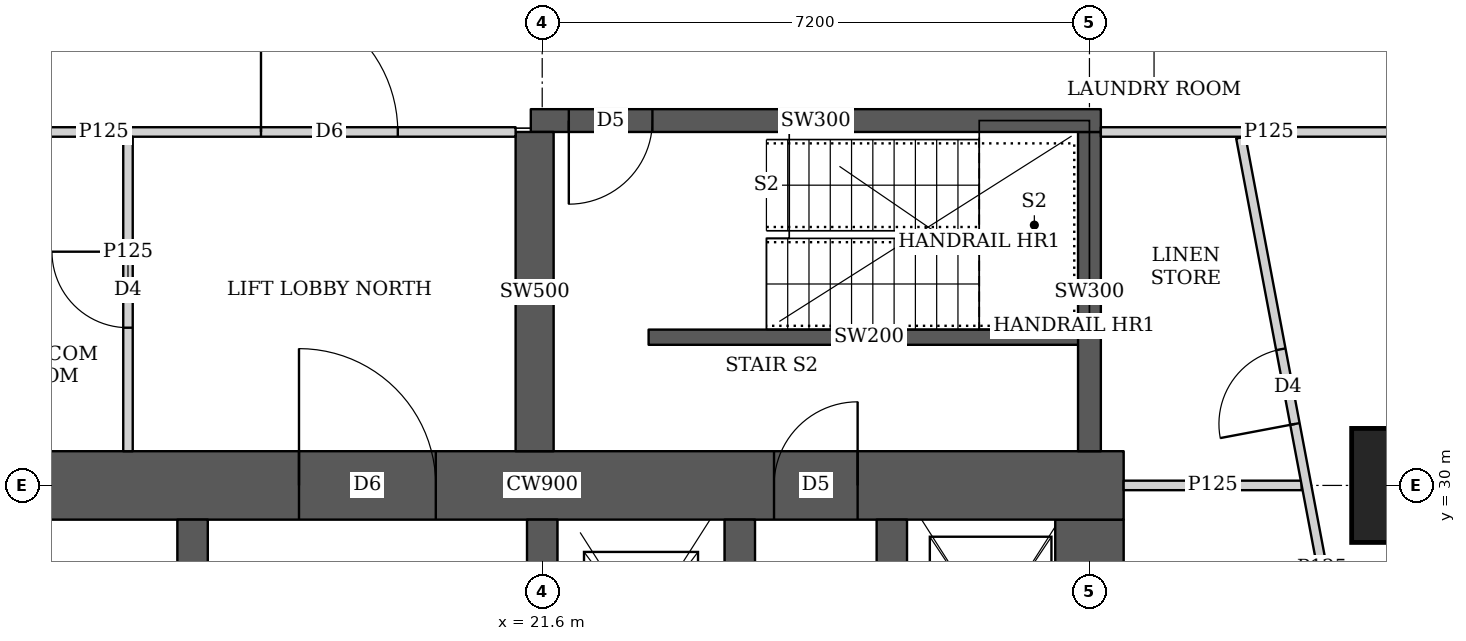
"""IFC4 building model, lengths in metres.
Left out: names, types, materials, properties, quantities, classifications, styles, units other than length and angle.
Written with IfcOpenShell. Run it as: python <this file> out.ifc"""

import sys

from ifc_helpers import new_model, si_unit, direction, frame, frame_2d, origin, origin_2d, place, context, subcontext, project, spatial, rectangle, extrude, element, fill, save


model = new_model("IFC4")
c1 = context("Model", 3, precision=1e-05, world=origin(), true_north=direction((0.0, 1.0)))
c2 = subcontext(c1, "Body", "Model", "MODEL_VIEW")
j1 = project(units=[si_unit("LENGTHUNIT", "METRE"), si_unit("PLANEANGLEUNIT", "RADIAN")], contexts=[c1])
p1 = place(None, origin())
s1 = spatial("IfcSite", under=j1, at=p1, CompositionType="ELEMENT")
p2 = place(p1, origin())
s2 = spatial("IfcBuilding", under=s1, at=p2, CompositionType="ELEMENT")
p3 = place(p2, frame((0.0, 0.0, 139.55)))
s3 = spatial("IfcBuildingStorey", under=s2, at=p3, CompositionType="ELEMENT", Elevation=139.55)
p4 = place(p3, frame((33.0, 30.0, 0.0), z_axis=(0.0, 0.0, 1.0), x_axis=(1.0, 0.0, 0.0)))
e1 = element("IfcColumn", 1, at=p4, inside=s3, PredefinedType="COLUMN", context=c2, shape_type="SweptSolid", body=[
    extrude(rectangle(XDim=1.5, YDim=1.5, at=origin_2d()), origin(), (0.0, 0.0, 1.0), 3.75),
])
p5 = place(p3, frame((13.95, 30.0, 0.0), z_axis=(0.0, 0.0, 1.0), x_axis=(1.0, 0.0, 0.0)))
e2 = element("IfcWall", 2, at=p5, inside=s3, PredefinedType="SHEAR", context=c2, shape_type="SweptSolid", body=[
    extrude(rectangle(XDim=15.3, YDim=0.9, at=frame_2d((7.65, 0.0))), origin(), (0.0, 0.0, 1.0), 3.75),
])
p6 = place(p5, frame((4.45, 0.0, 0.0)))
e3 = element("IfcOpeningElement", 3, at=p6, cuts=e2, PredefinedType="OPENING", context=c2, shape_type="SweptSolid", body=[
    extrude(rectangle(XDim=1.8, YDim=2.1, at=frame_2d((0.9, 1.05))), frame((0.0, 0.46, 0.0), z_axis=(0.0, -1.0, 0.0), x_axis=(1.0, 0.0, 0.0)), (0.0, 0.0, 1.0), 0.92),
])
p7 = place(p5, frame((10.7, 0.0, 0.0)))
e4 = element("IfcOpeningElement", 4, at=p7, cuts=e2, PredefinedType="OPENING", context=c2, shape_type="SweptSolid", body=[
    extrude(rectangle(XDim=1.1, YDim=2.1, at=frame_2d((0.55, 1.05))), frame((0.0, 0.46, 0.0), z_axis=(0.0, -1.0, 0.0), x_axis=(1.0, 0.0, 0.0)), (0.0, 0.0, 1.0), 0.92),
])
p8 = place(p3, frame((28.8, 15.45, 0.0), z_axis=(0.0, 0.0, 1.0), x_axis=(0.0, 1.0, 0.0)))
e5 = element("IfcWall", 5, at=p8, inside=s3, PredefinedType="SHEAR", context=c2, shape_type="SweptSolid", body=[
    extrude(rectangle(XDim=14.1, YDim=0.9, at=frame_2d((7.05, 0.0))), origin(), (0.0, 0.0, 1.0), 3.75),
])
p9 = place(p3, frame((17.0, 15.45, 0.0), z_axis=(0.0, 0.0, 1.0), x_axis=(0.0, 1.0, 0.0)))
e6 = element("IfcWall", 6, at=p9, inside=s3, PredefinedType="SHEAR", context=c2, shape_type="SweptSolid", body=[
    extrude(rectangle(XDim=14.1, YDim=0.4, at=frame_2d((7.05, 0.0))), origin(), (0.0, 0.0, 1.0), 3.75),
])
p10 = place(p9, frame((0.925, 0.0, 0.0)))
e7 = element("IfcOpeningElement", 7, at=p10, cuts=e6, PredefinedType="OPENING", context=c2, shape_type="SweptSolid", body=[
    extrude(rectangle(XDim=1.0, YDim=2.1, at=frame_2d((0.5, 1.05))), frame((0.0, 0.21, 0.0), z_axis=(0.0, -1.0, 0.0), x_axis=(1.0, 0.0, 0.0)), (0.0, 0.0, 1.0), 0.42),
])
p11 = place(p9, frame((4.675, 0.0, 0.0)))
e8 = element("IfcOpeningElement", 8, at=p11, cuts=e6, PredefinedType="OPENING", context=c2, shape_type="SweptSolid", body=[
    extrude(rectangle(XDim=1.0, YDim=2.1, at=frame_2d((0.5, 1.05))), frame((0.0, 0.21, 0.0), z_axis=(0.0, -1.0, 0.0), x_axis=(1.0, 0.0, 0.0)), (0.0, 0.0, 1.0), 0.42),
])
p12 = place(p9, frame((8.425, 0.0, 0.0)))
e9 = element("IfcOpeningElement", 9, at=p12, cuts=e6, PredefinedType="OPENING", context=c2, shape_type="SweptSolid", body=[
    extrude(rectangle(XDim=1.0, YDim=2.1, at=frame_2d((0.5, 1.05))), frame((0.0, 0.21, 0.0), z_axis=(0.0, -1.0, 0.0), x_axis=(1.0, 0.0, 0.0)), (0.0, 0.0, 1.0), 0.42),
])
p13 = place(p9, frame((12.175, 0.0, 0.0)))
e10 = element("IfcOpeningElement", 10, at=p13, cuts=e6, PredefinedType="OPENING", context=c2, shape_type="SweptSolid", body=[
    extrude(rectangle(XDim=1.0, YDim=2.1, at=frame_2d((0.5, 1.05))), frame((0.0, 0.21, 0.0), z_axis=(0.0, -1.0, 0.0), x_axis=(1.0, 0.0, 0.0)), (0.0, 0.0, 1.0), 0.42),
])
p14 = place(p3, frame((21.6, 15.45, 0.0), z_axis=(0.0, 0.0, 1.0), x_axis=(0.0, 1.0, 0.0)))
e11 = element("IfcWall", 11, at=p14, inside=s3, PredefinedType="SHEAR", context=c2, shape_type="SweptSolid", body=[
    extrude(rectangle(XDim=14.1, YDim=0.4, at=frame_2d((7.05, 0.0))), origin(), (0.0, 0.0, 1.0), 3.75),
])
p15 = place(p14, frame((0.875, 0.0, 0.0)))
e12 = element("IfcOpeningElement", 12, at=p15, cuts=e11, PredefinedType="OPENING", context=c2, shape_type="SweptSolid", body=[
    extrude(rectangle(XDim=1.1, YDim=2.1, at=frame_2d((0.55, 1.05))), frame((0.0, 0.21, 0.0), z_axis=(0.0, -1.0, 0.0), x_axis=(1.0, 0.0, 0.0)), (0.0, 0.0, 1.0), 0.42),
])
p16 = place(p14, frame((4.625, 0.0, 0.0)))
e13 = element("IfcOpeningElement", 13, at=p16, cuts=e11, PredefinedType="OPENING", context=c2, shape_type="SweptSolid", body=[
    extrude(rectangle(XDim=1.1, YDim=2.1, at=frame_2d((0.55, 1.05))), frame((0.0, 0.21, 0.0), z_axis=(0.0, -1.0, 0.0), x_axis=(1.0, 0.0, 0.0)), (0.0, 0.0, 1.0), 0.42),
])
p17 = place(p14, frame((8.375, 0.0, 0.0)))
e14 = element("IfcOpeningElement", 14, at=p17, cuts=e11, PredefinedType="OPENING", context=c2, shape_type="SweptSolid", body=[
    extrude(rectangle(XDim=1.1, YDim=2.1, at=frame_2d((0.55, 1.05))), frame((0.0, 0.21, 0.0), z_axis=(0.0, -1.0, 0.0), x_axis=(1.0, 0.0, 0.0)), (0.0, 0.0, 1.0), 0.42),
])
p18 = place(p14, frame((12.125, 0.0, 0.0)))
e15 = element("IfcOpeningElement", 15, at=p18, cuts=e11, PredefinedType="OPENING", context=c2, shape_type="SweptSolid", body=[
    extrude(rectangle(XDim=1.1, YDim=2.1, at=frame_2d((0.55, 1.05))), frame((0.0, 0.21, 0.0), z_axis=(0.0, -1.0, 0.0), x_axis=(1.0, 0.0, 0.0)), (0.0, 0.0, 1.0), 0.42),
])
p19 = place(p3, frame((24.2, 15.45, 0.0), z_axis=(0.0, 0.0, 1.0), x_axis=(0.0, 1.0, 0.0)))
e16 = element("IfcWall", 16, at=p19, inside=s3, PredefinedType="SHEAR", context=c2, shape_type="SweptSolid", body=[
    extrude(rectangle(XDim=14.1, YDim=0.4, at=frame_2d((7.05, 0.0))), origin(), (0.0, 0.0, 1.0), 3.75),
])
p20 = place(p3, frame((26.2, 26.45, 0.0), z_axis=(0.0, 0.0, 1.0), x_axis=(0.0, 1.0, 0.0)))
e17 = element("IfcWall", 17, at=p20, inside=s3, PredefinedType="SHEAR", context=c2, shape_type="SweptSolid", body=[
    extrude(rectangle(XDim=3.1, YDim=0.4, at=frame_2d((1.55, 0.0))), origin(), (0.0, 0.0, 1.0), 3.75),
])
p21 = place(p20, frame((1.075, 0.0, 0.0)))
e18 = element("IfcOpeningElement", 18, at=p21, cuts=e17, PredefinedType="OPENING", context=c2, shape_type="SweptSolid", body=[
    extrude(rectangle(XDim=1.2, YDim=2.1, at=frame_2d((0.6, 1.05))), frame((0.0, 0.21, 0.0), z_axis=(0.0, -1.0, 0.0), x_axis=(1.0, 0.0, 0.0)), (0.0, 0.0, 1.0), 0.42),
])
p22 = place(p3, frame((21.45, 34.8, 0.0), z_axis=(0.0, 0.0, 1.0), x_axis=(1.0, 0.0, 0.0)))
e19 = element("IfcWall", 19, at=p22, inside=s3, PredefinedType="SHEAR", context=c2, shape_type="SweptSolid", body=[
    extrude(rectangle(XDim=7.5, YDim=0.3, at=frame_2d((3.75, 0.0))), origin(), (0.0, 0.0, 1.0), 3.75),
])
p23 = place(p22, frame((0.5, 0.0, 0.0)))
e20 = element("IfcOpeningElement", 20, at=p23, cuts=e19, PredefinedType="OPENING", context=c2, shape_type="SweptSolid", body=[
    extrude(rectangle(XDim=1.1, YDim=2.1, at=frame_2d((0.55, 1.05))), frame((0.0, 0.16, 0.0), z_axis=(0.0, -1.0, 0.0), x_axis=(1.0, 0.0, 0.0)), (0.0, 0.0, 1.0), 0.32),
])
p24 = place(p3, frame((21.5, 30.45, 0.0), z_axis=(0.0, 0.0, 1.0), x_axis=(0.0, 1.0, 0.0)))
e21 = element("IfcWall", 21, at=p24, inside=s3, PredefinedType="SHEAR", context=c2, shape_type="SweptSolid", body=[
    extrude(rectangle(XDim=4.2, YDim=0.5, at=frame_2d((2.1, 0.0))), origin(), (0.0, 0.0, 1.0), 3.75),
])
p25 = place(p3, frame((28.8, 30.45, 0.0), z_axis=(0.0, 0.0, 1.0), x_axis=(0.0, 1.0, 0.0)))
e22 = element("IfcWall", 22, at=p25, inside=s3, PredefinedType="SHEAR", context=c2, shape_type="SweptSolid", body=[
    extrude(rectangle(XDim=4.2, YDim=0.3, at=frame_2d((2.1, 0.0))), origin(), (0.0, 0.0, 1.0), 3.75),
])
p26 = place(p3, frame((10.413, 34.65, 0.0), z_axis=(0.0, 0.0, 1.0), x_axis=(1.0, 0.0, 0.0)))
e23 = element("IfcWall", 23, at=p26, inside=s3, PredefinedType="PARTITIONING", context=c2, shape_type="SweptSolid", body=[
    extrude(rectangle(XDim=10.837, YDim=0.125, at=frame_2d((5.418, 0.0))), origin(), (0.0, 0.0, 1.0), 3.5),
])
p27 = place(p26, frame((7.487, 0.0, 0.0)))
e24 = element("IfcOpeningElement", 24, at=p27, cuts=e23, PredefinedType="OPENING", context=c2, shape_type="SweptSolid", body=[
    extrude(rectangle(XDim=1.8, YDim=2.1, at=frame_2d((0.9, 1.05))), frame((0.0, 0.073, 0.0), z_axis=(0.0, -1.0, 0.0), x_axis=(1.0, 0.0, 0.0)), (0.0, 0.0, 1.0), 0.145),
])
p28 = place(p3, frame((16.15, 30.45, 0.0), z_axis=(0.0, 0.0, 1.0), x_axis=(0.0, 1.0, 0.0)))
e25 = element("IfcWall", 25, at=p28, inside=s3, PredefinedType="PARTITIONING", context=c2, shape_type="SweptSolid", body=[
    extrude(rectangle(XDim=4.137, YDim=0.125, at=frame_2d((2.068, 0.0))), origin(), (0.0, 0.0, 1.0), 3.5),
])
p29 = place(p28, frame((1.625, 0.0, 0.0)))
e26 = element("IfcOpeningElement", 26, at=p29, cuts=e25, PredefinedType="OPENING", context=c2, shape_type="SweptSolid", body=[
    extrude(rectangle(XDim=1.0, YDim=2.1, at=frame_2d((0.5, 1.05))), frame((0.0, 0.073, 0.0), z_axis=(0.0, -1.0, 0.0), x_axis=(1.0, 0.0, 0.0)), (0.0, 0.0, 1.0), 0.145),
])
p30 = place(p3, frame((28.95, 34.65, 0.0), z_axis=(0.0, 0.0, 1.0), x_axis=(1.0, 0.0, 0.0)))
e27 = element("IfcWall", 27, at=p30, inside=s3, PredefinedType="PARTITIONING", context=c2, shape_type="SweptSolid", body=[
    extrude(rectangle(XDim=4.423, YDim=0.125, at=frame_2d((2.211, 0.0))), origin(), (0.0, 0.0, 1.0), 3.5),
])
p31 = place(p3, frame((32.929, 23.263, 0.0), z_axis=(0.0, 0.0, 1.0), x_axis=(-0.185612234763, 0.982623070311, 0.0)))
e28 = element("IfcWall", 28, at=p31, inside=s3, PredefinedType="PARTITIONING", context=c2, shape_type="SweptSolid", body=[
    extrude(rectangle(XDim=11.513, YDim=0.125, at=frame_2d((5.756, 0.0))), origin(), (0.0, 0.0, 1.0), 3.5),
])
p32 = place(p31, frame((0.15, 0.0, 0.0)))
e29 = element("IfcOpeningElement", 29, at=p32, cuts=e28, PredefinedType="OPENING", context=c2, shape_type="SweptSolid", body=[
    extrude(rectangle(XDim=1.0, YDim=2.1, at=frame_2d((0.5, 1.05))), frame((0.0, 0.073, 0.0), z_axis=(0.0, -1.0, 0.0), x_axis=(1.0, 0.0, 0.0)), (0.0, 0.0, 1.0), 0.145),
])
p33 = place(p31, frame((7.679, 0.0, 0.0)))
e30 = element("IfcOpeningElement", 30, at=p33, cuts=e28, PredefinedType="OPENING", context=c2, shape_type="SweptSolid", body=[
    extrude(rectangle(XDim=1.0, YDim=2.1, at=frame_2d((0.5, 1.05))), frame((0.0, 0.073, 0.0), z_axis=(0.0, -1.0, 0.0), x_axis=(1.0, 0.0, 0.0)), (0.0, 0.0, 1.0), 0.145),
])
p34 = place(p3, frame((29.25, 30.0, 0.0), z_axis=(0.0, 0.0, 1.0), x_axis=(1.0, 0.0, 0.0)))
e31 = element("IfcWall", 31, at=p34, inside=s3, PredefinedType="PARTITIONING", context=c2, shape_type="SweptSolid", body=[
    extrude(rectangle(XDim=2.342, YDim=0.125, at=frame_2d((1.171, 0.0))), origin(), (0.0, 0.0, 1.0), 3.5),
])
p35 = place(p3, frame((23.0, 31.95, 0.0), z_axis=(0.0, 0.0, 1.0), x_axis=(1.0, 0.0, 0.0)))
e32 = element("IfcWall", 32, at=p35, inside=s3, PredefinedType="SHEAR", context=c2, shape_type="SweptSolid", body=[
    extrude(rectangle(XDim=5.8, YDim=0.2, at=frame_2d((2.9, 0.0))), origin(), (0.0, 0.0, 1.0), 3.75),
])
p36 = place(p29, origin())
e33 = element("IfcDoor", 33, at=p36, inside=s3, OperationType="SINGLE_SWING_RIGHT", PredefinedType="DOOR", context=c2, shape_type="SweptSolid", body=[
    extrude(rectangle(XDim=1.0, YDim=2.1, at=frame_2d((0.5, 1.05))), frame((0.0, 0.025, 0.0), z_axis=(0.0, -1.0, 0.0), x_axis=(1.0, 0.0, 0.0)), (0.0, 0.0, 1.0), 0.05),
])
fill(e26, e33)
p37 = place(p27, origin())
e34 = element("IfcDoor", 34, at=p37, inside=s3, OperationType="DOUBLE_DOOR_SINGLE_SWING", PredefinedType="DOOR", context=c2, shape_type="SweptSolid", body=[
    extrude(rectangle(XDim=1.8, YDim=2.1, at=frame_2d((0.9, 1.05))), frame((0.0, 0.025, 0.0), z_axis=(0.0, -1.0, 0.0), x_axis=(1.0, 0.0, 0.0)), (0.0, 0.0, 1.0), 0.05),
])
fill(e24, e34)
p38 = place(p33, origin())
e35 = element("IfcDoor", 35, at=p38, inside=s3, OperationType="SINGLE_SWING_LEFT", PredefinedType="DOOR", context=c2, shape_type="SweptSolid", body=[
    extrude(rectangle(XDim=1.0, YDim=2.1, at=frame_2d((0.5, 1.05))), frame((0.0, 0.025, 0.0), z_axis=(0.0, -1.0, 0.0), x_axis=(1.0, 0.0, 0.0)), (0.0, 0.0, 1.0), 0.05),
])
fill(e30, e35)
p39 = place(p6, origin())
e36 = element("IfcDoor", 36, at=p39, inside=s3, OperationType="DOUBLE_DOOR_SINGLE_SWING", PredefinedType="DOOR", context=c2, shape_type="SweptSolid", body=[
    extrude(rectangle(XDim=1.8, YDim=2.1, at=frame_2d((0.9, 1.05))), frame((0.0, 0.025, 0.0), z_axis=(0.0, -1.0, 0.0), x_axis=(1.0, 0.0, 0.0)), (0.0, 0.0, 1.0), 0.05),
])
fill(e3, e36)
p40 = place(p7, origin())
e37 = element("IfcDoor", 37, at=p40, inside=s3, OperationType="SINGLE_SWING_RIGHT", PredefinedType="DOOR", context=c2, shape_type="SweptSolid", body=[
    extrude(rectangle(XDim=1.1, YDim=2.1, at=frame_2d((0.55, 1.05))), frame((0.0, 0.025, 0.0), z_axis=(0.0, -1.0, 0.0), x_axis=(1.0, 0.0, 0.0)), (0.0, 0.0, 1.0), 0.05),
])
fill(e4, e37)
p41 = place(p23, origin())
e38 = element("IfcDoor", 38, at=p41, inside=s3, OperationType="SINGLE_SWING_RIGHT", PredefinedType="DOOR", context=c2, shape_type="SweptSolid", body=[
    extrude(rectangle(XDim=1.1, YDim=2.1, at=frame_2d((0.55, 1.05))), frame((0.0, 0.025, 0.0), z_axis=(0.0, -1.0, 0.0), x_axis=(1.0, 0.0, 0.0)), (0.0, 0.0, 1.0), 0.05),
])
fill(e20, e38)
save(model, sys.argv[1])
